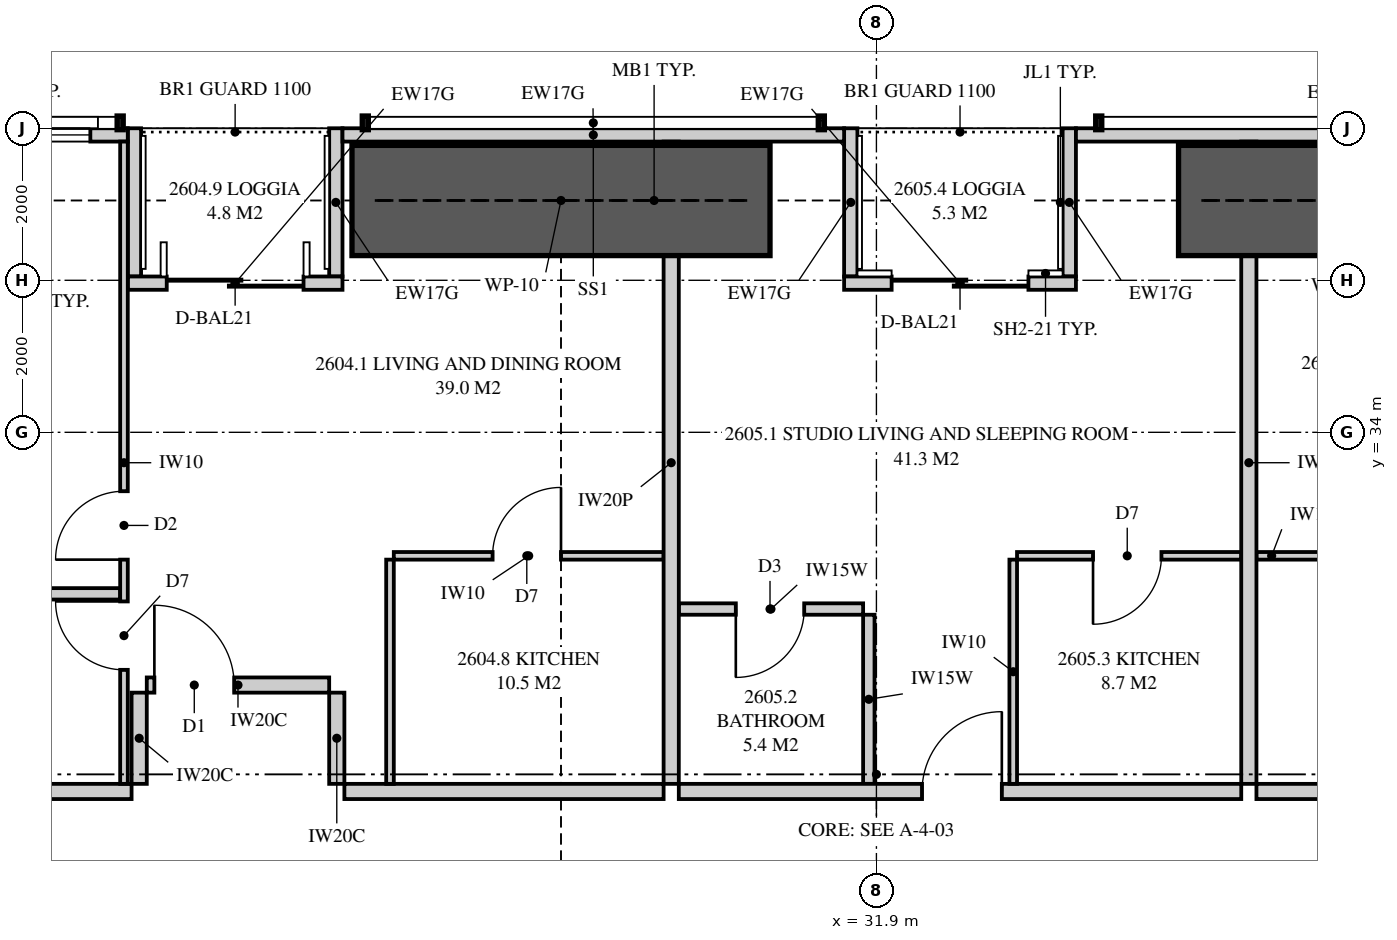
"""IFC4 building model, lengths in metres.
Left out: names, types, materials, properties, quantities, classifications, styles, units other than length and angle.
Written with IfcOpenShell. Run it as: python <this file> out.ifc"""

import sys

from ifc_helpers import new_model, si_unit, direction, frame, frame_2d, origin, place, context, subcontext, project, spatial, polyline, rectangle, outline, extrude, element, fill, save


model = new_model("IFC4")
c1 = context("Model", 3, precision=1e-05, world=origin(), true_north=direction((0.0, 1.0)))
c2 = subcontext(c1, "Body", "Model", "MODEL_VIEW")
j1 = project(units=[si_unit("LENGTHUNIT", "METRE"), si_unit("PLANEANGLEUNIT", "RADIAN")], contexts=[c1])
p1 = place(None, origin())
s1 = spatial("IfcSite", under=j1, at=p1, CompositionType="ELEMENT")
p2 = place(p1, origin())
s2 = spatial("IfcBuilding", under=s1, at=p2, CompositionType="ELEMENT")
p3 = place(p2, frame((0.0, 0.0, 98.15)))
s3 = spatial("IfcBuildingStorey", under=s2, at=p3, CompositionType="ELEMENT", Elevation=98.15)
p4 = place(p3, frame((41.449, 37.913, 0.0), z_axis=(0.0, 0.0, 1.0), x_axis=(-1.0, 0.0, 0.0)))
e1 = element("IfcWall", 1, at=p4, inside=s3, PredefinedType="SOLIDWALL", context=c2, shape_type="SweptSolid", body=[
    extrude(outline(polyline([(0.0, 0.0), (6.924, 0.0), (6.924, 2.15), (2.824, 2.15), (2.824, 3.11), (2.666, 3.11), (2.666, 2.15), (2.62, 2.15), (2.62, 3.11), (0.0, 3.11), (0.0, 0.0)])), frame((0.0, 0.087, 0.0), z_axis=(0.0, -1.0, 0.0), x_axis=(1.0, 0.0, 0.0)), (0.0, 0.0, 1.0), 0.175),
])
p5 = place(p3, frame((31.475, 37.913, 0.0), z_axis=(0.0, 0.0, 1.0), x_axis=(-1.0, 0.0, 0.0)))
e2 = element("IfcWall", 2, at=p5, inside=s3, PredefinedType="SOLIDWALL", context=c2, shape_type="SweptSolid", body=[
    extrude(rectangle(XDim=6.6, YDim=0.175, at=frame_2d((3.3, 0.0))), origin(), (0.0, 0.0, 1.0), 2.15),
])
p6 = place(p3, frame((22.05, 37.913, 0.0), z_axis=(0.0, 0.0, 1.0), x_axis=(-1.0, 0.0, 0.0)))
e3 = element("IfcWall", 3, at=p6, inside=s3, PredefinedType="SOLIDWALL", context=c2, shape_type="SweptSolid", body=[
    extrude(outline(polyline([(0.0, 0.0), (12.999, 0.0), (12.999, 3.11), (5.378, 3.11), (5.378, 2.15), (5.333, 2.15), (5.333, 3.11), (5.175, 3.11), (5.175, 2.15), (0.0, 2.15), (0.0, 0.0)])), frame((0.0, 0.087, 0.0), z_axis=(0.0, -1.0, 0.0), x_axis=(1.0, 0.0, 0.0)), (0.0, 0.0, 1.0), 0.175),
])
p7 = place(p6, frame((0.492, 0.0, 0.4)))
e4 = element("IfcOpeningElement", 4, at=p7, cuts=e3, PredefinedType="OPENING", context=c2, shape_type="SweptSolid", body=[
    extrude(rectangle(XDim=1.8, YDim=1.7, at=frame_2d((0.9, 0.85))), frame((0.0, 0.097, 0.0), z_axis=(0.0, -1.0, 0.0), x_axis=(1.0, 0.0, 0.0)), (0.0, 0.0, 1.0), 0.195),
])
p8 = place(p6, frame((8.065, 0.0, 0.4)))
e5 = element("IfcOpeningElement", 5, at=p8, cuts=e3, PredefinedType="OPENING", context=c2, shape_type="SweptSolid", body=[
    extrude(rectangle(XDim=1.8, YDim=1.7, at=frame_2d((0.9, 0.85))), frame((0.0, 0.097, 0.0), z_axis=(0.0, -1.0, 0.0), x_axis=(1.0, 0.0, 0.0)), (0.0, 0.0, 1.0), 0.195),
])
p9 = place(p3, frame((34.525, 35.962, 0.0), z_axis=(0.0, 0.0, 1.0), x_axis=(-1.0, 0.0, 0.0)))
e6 = element("IfcWall", 6, at=p9, inside=s3, PredefinedType="SOLIDWALL", context=c2, shape_type="SweptSolid", body=[
    extrude(rectangle(XDim=3.05, YDim=0.175, at=frame_2d((1.525, 0.0))), origin(), (0.0, 0.0, 1.0), 3.11),
])
p10 = place(p9, frame((0.625, 0.0, 0.0)))
e7 = element("IfcOpeningElement", 7, at=p10, cuts=e6, PredefinedType="OPENING", context=c2, shape_type="SweptSolid", body=[
    extrude(rectangle(XDim=1.8, YDim=2.1, at=frame_2d((0.9, 1.05))), frame((0.0, 0.097, 0.0), z_axis=(0.0, -1.0, 0.0), x_axis=(1.0, 0.0, 0.0)), (0.0, 0.0, 1.0), 0.195),
])
for number, where, z_axis, x_axis in (
    (8, (34.438, 38.0, 0.0), (0.0, 0.0, 1.0), (0.0, -1.0, 0.0)),
    (9, (31.562, 38.0, 0.0), (0.0, 0.0, 1.0), (0.0, -1.0, 0.0)),
):
    element("IfcWall", number, at=place(p3, frame(where, z_axis=z_axis, x_axis=x_axis)), inside=s3, PredefinedType="SOLIDWALL", context=c2, shape_type="SweptSolid", body=[
        extrude(outline(polyline([(0.0, 0.0), (1.95, 0.0), (1.95, 3.11), (1.75, 3.11), (1.75, 2.15), (0.15, 2.15), (0.15, 3.11), (0.0, 3.11), (0.0, 0.0)])), frame((0.0, 0.087, 0.0), z_axis=(0.0, -1.0, 0.0), x_axis=(1.0, 0.0, 0.0)), (0.0, 0.0, 1.0), 0.175),
    ])
p11 = place(p3, frame((24.875, 35.962, 0.0), z_axis=(0.0, 0.0, 1.0), x_axis=(-1.0, 0.0, 0.0)))
e10 = element("IfcWall", 10, at=p11, inside=s3, PredefinedType="SOLIDWALL", context=c2, shape_type="SweptSolid", body=[
    extrude(rectangle(XDim=2.825, YDim=0.175, at=frame_2d((1.413, 0.0))), origin(), (0.0, 0.0, 1.0), 3.11),
])
p12 = place(p11, frame((0.512, 0.0, 0.0)))
e11 = element("IfcOpeningElement", 11, at=p12, cuts=e10, PredefinedType="OPENING", context=c2, shape_type="SweptSolid", body=[
    extrude(rectangle(XDim=1.8, YDim=2.1, at=frame_2d((0.9, 1.05))), frame((0.0, 0.097, 0.0), z_axis=(0.0, -1.0, 0.0), x_axis=(1.0, 0.0, 0.0)), (0.0, 0.0, 1.0), 0.195),
])
for number, where, z_axis, x_axis in (
    (12, (24.788, 38.0, 0.0), (0.0, 0.0, 1.0), (0.0, -1.0, 0.0)),
    (13, (22.137, 38.0, 0.0), (0.0, 0.0, 1.0), (0.0, -1.0, 0.0)),
):
    element("IfcWall", number, at=place(p3, frame(where, z_axis=z_axis, x_axis=x_axis)), inside=s3, PredefinedType="SOLIDWALL", context=c2, shape_type="SweptSolid", body=[
        extrude(outline(polyline([(0.0, 0.0), (1.95, 0.0), (1.95, 3.11), (1.75, 3.11), (1.75, 2.15), (0.15, 2.15), (0.15, 3.11), (0.0, 3.11), (0.0, 0.0)])), frame((0.0, 0.087, 0.0), z_axis=(0.0, -1.0, 0.0), x_axis=(1.0, 0.0, 0.0)), (0.0, 0.0, 1.0), 0.175),
    ])
p13 = place(p3, frame((29.2, 37.825, 0.0), z_axis=(0.0, 0.0, 1.0), x_axis=(0.0, -1.0, 0.0)))
e14 = element("IfcWall", 14, at=p13, inside=s3, PredefinedType="PARTITIONING", context=c2, shape_type="SweptSolid", body=[
    extrude(outline(polyline([(0.529, 2.15), (0.0, 2.15), (0.0, 0.0), (0.529, 0.0), (0.529, 0.513), (1.021, 0.513), (1.021, 0.0), (8.45, 0.0), (8.45, 3.11), (1.685, 3.11), (1.685, 2.15), (1.021, 2.15), (1.021, 1.637), (0.529, 1.637), (0.529, 2.15)])), frame((0.0, 0.1, 0.0), z_axis=(0.0, -1.0, 0.0), x_axis=(1.0, 0.0, 0.0)), (0.0, 0.0, 1.0), 0.2),
])
p14 = place(p3, frame((17.775, 29.275, 0.0), z_axis=(0.0, 0.0, 1.0), x_axis=(1.0, 0.0, 0.0)))
e15 = element("IfcWall", 15, at=p14, inside=s3, PredefinedType="PARTITIONING", context=c2, shape_type="SweptSolid", body=[
    extrude(rectangle(XDim=4.325, YDim=0.2, at=frame_2d((2.163, 0.0))), origin(), (0.0, 0.0, 1.0), 3.11),
])
p15 = place(p3, frame((22.0, 37.825, 0.0), z_axis=(0.0, 0.0, 1.0), x_axis=(0.0, -1.0, 0.0)))
e16 = element("IfcWall", 16, at=p15, inside=s3, PredefinedType="PARTITIONING", context=c2, shape_type="SweptSolid", body=[
    extrude(outline(polyline([(0.0, 0.0), (8.45, 0.0), (8.45, 3.11), (1.635, 3.11), (1.635, 2.15), (0.0, 2.15), (0.0, 3.11), (0.0, 0.0)])), frame((0.0, 0.05, 0.0), z_axis=(0.0, -1.0, 0.0), x_axis=(1.0, 0.0, 0.0)), (0.0, 0.0, 1.0), 0.1),
])
p16 = place(p15, frame((4.6, 0.0, 0.0)))
e17 = element("IfcOpeningElement", 17, at=p16, cuts=e16, PredefinedType="OPENING", context=c2, shape_type="SweptSolid", body=[
    extrude(rectangle(XDim=0.9, YDim=2.1, at=frame_2d((0.45, 1.05))), frame((0.0, 0.06, 0.0), z_axis=(0.0, -1.0, 0.0), x_axis=(1.0, 0.0, 0.0)), (0.0, 0.0, 1.0), 0.12),
])
p17 = place(p15, frame((6.05, 0.0, 0.0)))
e18 = element("IfcOpeningElement", 18, at=p17, cuts=e16, PredefinedType="OPENING", context=c2, shape_type="SweptSolid", body=[
    extrude(rectangle(XDim=0.9, YDim=2.1, at=frame_2d((0.45, 1.05))), frame((0.0, 0.06, 0.0), z_axis=(0.0, -1.0, 0.0), x_axis=(1.0, 0.0, 0.0)), (0.0, 0.0, 1.0), 0.12),
])
p18 = place(p3, frame((17.75, 31.875, 0.0), z_axis=(0.0, 0.0, 1.0), x_axis=(1.0, 0.0, 0.0)))
e19 = element("IfcWall", 19, at=p18, inside=s3, PredefinedType="PLUMBINGWALL", context=c2, shape_type="SweptSolid", body=[
    extrude(rectangle(XDim=4.2, YDim=0.15, at=frame_2d((2.1, 0.0))), origin(), (0.0, 0.0, 1.0), 3.11),
])
p19 = place(p3, frame((25.55, 32.375, 0.0), z_axis=(0.0, 0.0, 1.0), x_axis=(1.0, 0.0, 0.0)))
e20 = element("IfcWall", 20, at=p19, inside=s3, PredefinedType="PARTITIONING", context=c2, shape_type="SweptSolid", body=[
    extrude(outline(polyline([(0.0, 0.0), (3.55, 0.0), (3.55, 3.11), (2.487, 3.11), (2.487, 2.541), (1.913, 2.541), (1.913, 3.11), (0.0, 3.11), (0.0, 0.0)])), frame((0.0, 0.05, 0.0), z_axis=(0.0, -1.0, 0.0), x_axis=(1.0, 0.0, 0.0)), (0.0, 0.0, 1.0), 0.1),
])
p20 = place(p19, frame((1.3, 0.0, 0.0)))
e21 = element("IfcOpeningElement", 21, at=p20, cuts=e20, PredefinedType="OPENING", context=c2, shape_type="SweptSolid", body=[
    extrude(rectangle(XDim=0.9, YDim=2.1, at=frame_2d((0.45, 1.05))), frame((0.0, 0.06, 0.0), z_axis=(0.0, -1.0, 0.0), x_axis=(1.0, 0.0, 0.0)), (0.0, 0.0, 1.0), 0.12),
])
p21 = place(p3, frame((25.5, 32.325, 0.0), z_axis=(0.0, 0.0, 1.0), x_axis=(0.0, -1.0, 0.0)))
e22 = element("IfcWall", 22, at=p21, inside=s3, PredefinedType="PARTITIONING", context=c2, shape_type="SweptSolid", body=[
    extrude(rectangle(XDim=2.95, YDim=0.1, at=frame_2d((1.475, 0.0))), origin(), (0.0, 0.0, 1.0), 3.11),
])
p22 = place(p3, frame((36.8, 37.825, 0.0), z_axis=(0.0, 0.0, 1.0), x_axis=(0.0, -1.0, 0.0)))
e23 = element("IfcWall", 23, at=p22, inside=s3, PredefinedType="PARTITIONING", context=c2, shape_type="SweptSolid", body=[
    extrude(outline(polyline([(0.529, 2.15), (0.0, 2.15), (0.0, 0.0), (0.529, 0.0), (0.529, 0.257), (1.021, 0.257), (1.021, 0.0), (8.45, 0.0), (8.45, 3.11), (1.685, 3.11), (1.685, 2.15), (1.021, 2.15), (1.021, 1.894), (0.529, 1.894), (0.529, 2.15)])), frame((0.0, 0.1, 0.0), z_axis=(0.0, -1.0, 0.0), x_axis=(1.0, 0.0, 0.0)), (0.0, 0.0, 1.0), 0.2),
])
p23 = place(p3, frame((29.3, 29.275, 0.0), z_axis=(0.0, 0.0, 1.0), x_axis=(1.0, 0.0, 0.0)))
e24 = element("IfcWall", 24, at=p23, inside=s3, PredefinedType="PARTITIONING", context=c2, shape_type="SweptSolid", body=[
    extrude(rectangle(XDim=7.4, YDim=0.2, at=frame_2d((3.7, 0.0))), origin(), (0.0, 0.0, 1.0), 3.11),
])
p24 = place(p23, frame((3.2, 0.0, 0.0)))
e25 = element("IfcOpeningElement", 25, at=p24, cuts=e24, PredefinedType="OPENING", context=c2, shape_type="SweptSolid", body=[
    extrude(rectangle(XDim=1.05, YDim=2.2, at=frame_2d((0.525, 1.1))), frame((0.0, 0.11, 0.0), z_axis=(0.0, -1.0, 0.0), x_axis=(1.0, 0.0, 0.0)), (0.0, 0.0, 1.0), 0.22),
])
p25 = place(p3, frame((29.3, 31.675, 0.0), z_axis=(0.0, 0.0, 1.0), x_axis=(1.0, 0.0, 0.0)))
e26 = element("IfcWall", 26, at=p25, inside=s3, PredefinedType="PLUMBINGWALL", context=c2, shape_type="SweptSolid", body=[
    extrude(rectangle(XDim=2.425, YDim=0.15, at=frame_2d((1.212, 0.0))), origin(), (0.0, 0.0, 1.0), 3.11),
])
p26 = place(p25, frame((0.75, 0.0, 0.0)))
e27 = element("IfcOpeningElement", 27, at=p26, cuts=e26, PredefinedType="OPENING", context=c2, shape_type="SweptSolid", body=[
    extrude(rectangle(XDim=0.9, YDim=2.1, at=frame_2d((0.45, 1.05))), frame((0.0, 0.085, 0.0), z_axis=(0.0, -1.0, 0.0), x_axis=(1.0, 0.0, 0.0)), (0.0, 0.0, 1.0), 0.17),
])
p27 = place(p3, frame((31.8, 31.6, 0.0), z_axis=(0.0, 0.0, 1.0), x_axis=(0.0, -1.0, 0.0)))
e28 = element("IfcWall", 28, at=p27, inside=s3, PredefinedType="PLUMBINGWALL", context=c2, shape_type="SweptSolid", body=[
    extrude(rectangle(XDim=2.225, YDim=0.15, at=frame_2d((1.113, 0.0))), origin(), (0.0, 0.0, 1.0), 3.11),
])
p28 = place(p3, frame((33.75, 32.375, 0.0), z_axis=(0.0, 0.0, 1.0), x_axis=(1.0, 0.0, 0.0)))
e29 = element("IfcWall", 29, at=p28, inside=s3, PredefinedType="PARTITIONING", context=c2, shape_type="SweptSolid", body=[
    extrude(rectangle(XDim=2.95, YDim=0.1, at=frame_2d((1.475, 0.0))), origin(), (0.0, 0.0, 1.0), 3.11),
])
p29 = place(p28, frame((1.0, 0.0, 0.0)))
e30 = element("IfcOpeningElement", 30, at=p29, cuts=e29, PredefinedType="OPENING", context=c2, shape_type="SweptSolid", body=[
    extrude(rectangle(XDim=0.9, YDim=2.1, at=frame_2d((0.45, 1.05))), frame((0.0, 0.06, 0.0), z_axis=(0.0, -1.0, 0.0), x_axis=(1.0, 0.0, 0.0)), (0.0, 0.0, 1.0), 0.12),
])
p30 = place(p3, frame((33.7, 32.325, 0.0), z_axis=(0.0, 0.0, 1.0), x_axis=(0.0, -1.0, 0.0)))
e31 = element("IfcWall", 31, at=p30, inside=s3, PredefinedType="PARTITIONING", context=c2, shape_type="SweptSolid", body=[
    extrude(rectangle(XDim=2.95, YDim=0.1, at=frame_2d((1.475, 0.0))), origin(), (0.0, 0.0, 1.0), 3.11),
])
p31 = place(p3, frame((36.9, 29.275, 0.0), z_axis=(0.0, 0.0, 1.0), x_axis=(1.0, 0.0, 0.0)))
e32 = element("IfcWall", 32, at=p31, inside=s3, PredefinedType="PARTITIONING", context=c2, shape_type="SweptSolid", body=[
    extrude(outline(polyline([(0.0, 0.0), (9.125, 0.0), (9.125, 3.11), (2.062, 3.11), (2.062, 2.541), (1.388, 2.541), (1.388, 3.11), (0.0, 3.11), (0.0, 0.0)])), frame((0.0, 0.1, 0.0), z_axis=(0.0, -1.0, 0.0), x_axis=(1.0, 0.0, 0.0)), (0.0, 0.0, 1.0), 0.2),
])
p32 = place(p31, frame((4.5, 0.0, 0.0)))
e33 = element("IfcOpeningElement", 33, at=p32, cuts=e32, PredefinedType="OPENING", context=c2, shape_type="SweptSolid", body=[
    extrude(rectangle(XDim=1.05, YDim=2.2, at=frame_2d((0.525, 1.1))), frame((0.0, 0.11, 0.0), z_axis=(0.0, -1.0, 0.0), x_axis=(1.0, 0.0, 0.0)), (0.0, 0.0, 1.0), 0.22),
])
p33 = place(p3, frame((36.9, 32.375, 0.0), z_axis=(0.0, 0.0, 1.0), x_axis=(1.0, 0.0, 0.0)))
e34 = element("IfcWall", 34, at=p33, inside=s3, PredefinedType="PARTITIONING", context=c2, shape_type="SweptSolid", body=[
    extrude(outline(polyline([(0.0, 0.0), (3.55, 0.0), (3.55, 3.11), (2.012, 3.11), (2.012, 2.541), (1.438, 2.541), (1.438, 3.11), (0.0, 3.11), (0.0, 0.0)])), frame((0.0, 0.05, 0.0), z_axis=(0.0, -1.0, 0.0), x_axis=(1.0, 0.0, 0.0)), (0.0, 0.0, 1.0), 0.1),
])
p34 = place(p33, frame((1.35, 0.0, 0.0)))
e35 = element("IfcOpeningElement", 35, at=p34, cuts=e34, PredefinedType="OPENING", context=c2, shape_type="SweptSolid", body=[
    extrude(rectangle(XDim=0.9, YDim=2.1, at=frame_2d((0.45, 1.05))), frame((0.0, 0.06, 0.0), z_axis=(0.0, -1.0, 0.0), x_axis=(1.0, 0.0, 0.0)), (0.0, 0.0, 1.0), 0.12),
])
p35 = place(p3, frame((24.9, 29.275, 0.0), z_axis=(0.0, 0.0, 1.0), x_axis=(1.0, 0.0, 0.0)))
e36 = element("IfcWall", 36, at=p35, inside=s3, PredefinedType="PARTITIONING", context=c2, shape_type="SweptSolid", body=[
    extrude(outline(polyline([(0.0, 0.0), (4.2, 0.0), (4.2, 3.11), (3.187, 3.11), (3.187, 2.541), (2.513, 2.541), (2.513, 3.11), (0.0, 3.11), (0.0, 0.0)])), frame((0.0, 0.1, 0.0), z_axis=(0.0, -1.0, 0.0), x_axis=(1.0, 0.0, 0.0)), (0.0, 0.0, 1.0), 0.2),
])
p36 = place(p3, frame((22.3, 30.675, 0.0), z_axis=(0.0, 0.0, 1.0), x_axis=(1.0, 0.0, 0.0)))
e37 = element("IfcWall", 37, at=p36, inside=s3, PredefinedType="PARTITIONING", context=c2, shape_type="SweptSolid", body=[
    extrude(rectangle(XDim=2.4, YDim=0.2, at=frame_2d((1.2, 0.0))), origin(), (0.0, 0.0, 1.0), 3.11),
])
p37 = place(p36, frame((0.1, 0.0, 0.0)))
e38 = element("IfcOpeningElement", 38, at=p37, cuts=e37, PredefinedType="OPENING", context=c2, shape_type="SweptSolid", body=[
    extrude(rectangle(XDim=1.05, YDim=2.2, at=frame_2d((0.525, 1.1))), frame((0.0, 0.11, 0.0), z_axis=(0.0, -1.0, 0.0), x_axis=(1.0, 0.0, 0.0)), (0.0, 0.0, 1.0), 0.22),
])
for number, where, z_axis, x_axis in (
    (39, (22.2, 29.375, 0.0), (0.0, 0.0, 1.0), (0.0, 1.0, 0.0)),
    (40, (24.8, 29.375, 0.0), (0.0, 0.0, 1.0), (0.0, 1.0, 0.0)),
):
    element("IfcWall", number, at=place(p3, frame(where, z_axis=z_axis, x_axis=x_axis)), inside=s3, PredefinedType="PARTITIONING", context=c2, shape_type="SweptSolid", body=[
        extrude(rectangle(XDim=1.2, YDim=0.2, at=frame_2d((0.6, 0.0))), origin(), (0.0, 0.0, 1.0), 3.11),
    ])
for number, where, z_axis, x_axis in (
    (41, (35.875, 37.05, 0.0), (0.0, 0.0, 1.0), (1.0, 0.0, 0.0)),
    (42, (25.0, 37.05, 0.0), (0.0, 0.0, 1.0), (1.0, 0.0, 0.0)),
):
    element("IfcWall", number, at=place(p3, frame(where, z_axis=z_axis, x_axis=x_axis)), inside=s3, PredefinedType="SHEAR", context=c2, shape_type="SweptSolid", body=[
        extrude(rectangle(XDim=5.5, YDim=1.45, at=frame_2d((2.75, 0.0))), origin(), (0.0, 0.0, 1.0), 3.35),
    ])
p38 = place(p10, origin())
e43 = element("IfcDoor", 43, at=p38, inside=s3, OperationType="SLIDING_TO_LEFT", PredefinedType="DOOR", context=c2, shape_type="SweptSolid", body=[
    extrude(rectangle(XDim=1.8, YDim=2.1, at=frame_2d((0.9, 1.05))), frame((0.0, 0.025, 0.0), z_axis=(0.0, -1.0, 0.0), x_axis=(1.0, 0.0, 0.0)), (0.0, 0.0, 1.0), 0.05),
])
fill(e7, e43)
p39 = place(p12, origin())
e44 = element("IfcDoor", 44, at=p39, inside=s3, OperationType="SLIDING_TO_LEFT", PredefinedType="DOOR", context=c2, shape_type="SweptSolid", body=[
    extrude(rectangle(XDim=1.8, YDim=2.1, at=frame_2d((0.9, 1.05))), frame((0.0, 0.025, 0.0), z_axis=(0.0, -1.0, 0.0), x_axis=(1.0, 0.0, 0.0)), (0.0, 0.0, 1.0), 0.05),
])
fill(e11, e44)
p40 = place(p7, origin())
e45 = element("IfcWindow", 45, at=p40, inside=s3, PartitioningType="SINGLE_PANEL", PredefinedType="WINDOW", context=c2, shape_type="SweptSolid", body=[
    extrude(rectangle(XDim=1.8, YDim=1.7, at=frame_2d((0.9, 0.85))), frame((0.0, 0.03, 0.0), z_axis=(0.0, -1.0, 0.0), x_axis=(1.0, 0.0, 0.0)), (0.0, 0.0, 1.0), 0.06),
])
fill(e4, e45)
p41 = place(p37, origin())
e46 = element("IfcDoor", 46, at=p41, inside=s3, OperationType="SINGLE_SWING_LEFT", PredefinedType="DOOR", context=c2, shape_type="SweptSolid", body=[
    extrude(rectangle(XDim=1.05, YDim=2.2, at=frame_2d((0.525, 1.1))), frame((0.0, 0.025, 0.0), z_axis=(0.0, -1.0, 0.0), x_axis=(1.0, 0.0, 0.0)), (0.0, 0.0, 1.0), 0.05),
])
fill(e38, e46)
p42 = place(p16, frame((0.9, 0.0, 0.0), z_axis=(0.0, 0.0, 1.0), x_axis=(-1.0, 0.0, 0.0)))
e47 = element("IfcDoor", 47, at=p42, inside=s3, OperationType="SINGLE_SWING_LEFT", PredefinedType="DOOR", context=c2, shape_type="SweptSolid", body=[
    extrude(rectangle(XDim=0.9, YDim=2.1, at=frame_2d((0.45, 1.05))), frame((0.0, 0.025, 0.0), z_axis=(0.0, -1.0, 0.0), x_axis=(1.0, 0.0, 0.0)), (0.0, 0.0, 1.0), 0.05),
])
fill(e17, e47)
p43 = place(p17, frame((0.9, 0.0, 0.0), z_axis=(0.0, 0.0, 1.0), x_axis=(-1.0, 0.0, 0.0)))
e48 = element("IfcDoor", 48, at=p43, inside=s3, OperationType="SINGLE_SWING_RIGHT", PredefinedType="DOOR", context=c2, shape_type="SweptSolid", body=[
    extrude(rectangle(XDim=0.9, YDim=2.1, at=frame_2d((0.45, 1.05))), frame((0.0, 0.025, 0.0), z_axis=(0.0, -1.0, 0.0), x_axis=(1.0, 0.0, 0.0)), (0.0, 0.0, 1.0), 0.05),
])
fill(e18, e48)
p44 = place(p20, origin())
e49 = element("IfcDoor", 49, at=p44, inside=s3, OperationType="SINGLE_SWING_RIGHT", PredefinedType="DOOR", context=c2, shape_type="SweptSolid", body=[
    extrude(rectangle(XDim=0.9, YDim=2.1, at=frame_2d((0.45, 1.05))), frame((0.0, 0.025, 0.0), z_axis=(0.0, -1.0, 0.0), x_axis=(1.0, 0.0, 0.0)), (0.0, 0.0, 1.0), 0.05),
])
fill(e21, e49)
p45 = place(p24, origin())
e50 = element("IfcDoor", 50, at=p45, inside=s3, OperationType="SINGLE_SWING_RIGHT", PredefinedType="DOOR", context=c2, shape_type="SweptSolid", body=[
    extrude(rectangle(XDim=1.05, YDim=2.2, at=frame_2d((0.525, 1.1))), frame((0.0, 0.025, 0.0), z_axis=(0.0, -1.0, 0.0), x_axis=(1.0, 0.0, 0.0)), (0.0, 0.0, 1.0), 0.05),
])
fill(e25, e50)
p46 = place(p26, frame((0.9, 0.0, 0.0), z_axis=(0.0, 0.0, 1.0), x_axis=(-1.0, 0.0, 0.0)))
e51 = element("IfcDoor", 51, at=p46, inside=s3, OperationType="SINGLE_SWING_RIGHT", PredefinedType="DOOR", context=c2, shape_type="SweptSolid", body=[
    extrude(rectangle(XDim=0.9, YDim=2.1, at=frame_2d((0.45, 1.05))), frame((0.0, 0.025, 0.0), z_axis=(0.0, -1.0, 0.0), x_axis=(1.0, 0.0, 0.0)), (0.0, 0.0, 1.0), 0.05),
])
fill(e27, e51)
p47 = place(p29, frame((0.9, 0.0, 0.0), z_axis=(0.0, 0.0, 1.0), x_axis=(-1.0, 0.0, 0.0)))
e52 = element("IfcDoor", 52, at=p47, inside=s3, OperationType="SINGLE_SWING_RIGHT", PredefinedType="DOOR", context=c2, shape_type="SweptSolid", body=[
    extrude(rectangle(XDim=0.9, YDim=2.1, at=frame_2d((0.45, 1.05))), frame((0.0, 0.025, 0.0), z_axis=(0.0, -1.0, 0.0), x_axis=(1.0, 0.0, 0.0)), (0.0, 0.0, 1.0), 0.05),
])
fill(e30, e52)
save(model, sys.argv[1])
